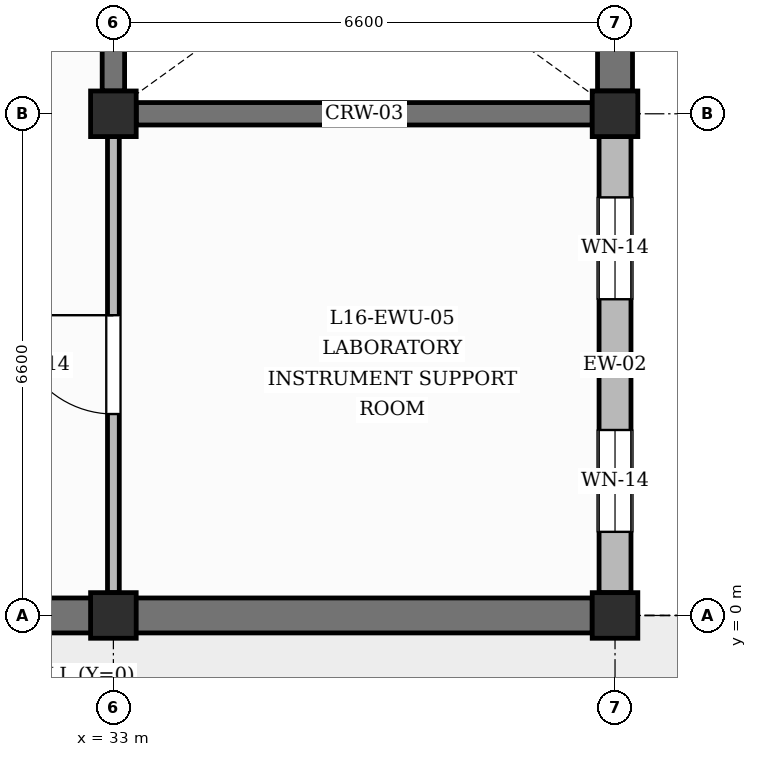
"""IFC4 building model, lengths in metres.
Left out: names, types, materials, properties, quantities, classifications, styles, units other than length and angle.
Written with IfcOpenShell. Run it as: python <this file> out.ifc"""

import sys

from ifc_helpers import new_model, si_unit, direction, frame, frame_2d, origin, origin_2d, place, context, subcontext, project, spatial, rectangle, extrude, element, fill, save


model = new_model("IFC4")
c1 = context("Model", 3, precision=1e-05, world=origin(), true_north=direction((0.0, 1.0)))
c2 = subcontext(c1, "Body", "Model", "MODEL_VIEW")
j1 = project(units=[si_unit("LENGTHUNIT", "METRE"), si_unit("PLANEANGLEUNIT", "RADIAN")], contexts=[c1])
p1 = place(None, origin())
s1 = spatial("IfcSite", under=j1, at=p1, CompositionType="ELEMENT")
p2 = place(p1, origin())
s2 = spatial("IfcBuilding", under=s1, at=p2, CompositionType="ELEMENT")
p3 = place(p2, frame((0.0, 0.0, 69.0)))
s3 = spatial("IfcBuildingStorey", under=s2, at=p3, CompositionType="ELEMENT", Elevation=69.0)
for number, where, z_axis, x_axis in (
    (1, (33.0, 0.0, 0.0), (0.0, 0.0, 1.0), (1.0, 0.0, 0.0)),
    (2, (33.0, 6.6, 0.0), (0.0, 0.0, 1.0), (1.0, 0.0, 0.0)),
    (3, (39.6, 0.0, 0.0), (0.0, 0.0, 1.0), (1.0, 0.0, 0.0)),
    (4, (39.6, 6.6, 0.0), (0.0, 0.0, 1.0), (1.0, 0.0, 0.0)),
):
    element("IfcColumn", number, at=place(p3, frame(where, z_axis=z_axis, x_axis=x_axis)), inside=s3, PredefinedType="COLUMN", context=c2, shape_type="SweptSolid", body=[
        extrude(rectangle(XDim=0.6, YDim=0.6, at=origin_2d()), origin(), (0.0, 0.0, 1.0), 4.2),
    ])
for number, where, z_axis, x_axis in (
    (5, (26.7, 0.0, 0.0), (0.0, 0.0, 1.0), (1.0, 0.0, 0.0)),
    (6, (33.3, 0.0, 0.0), (0.0, 0.0, 1.0), (1.0, 0.0, 0.0)),
):
    element("IfcWall", number, at=place(p3, frame(where, z_axis=z_axis, x_axis=x_axis)), inside=s3, PredefinedType="SOLIDWALL", context=c2, shape_type="SweptSolid", body=[
        extrude(rectangle(XDim=6.0, YDim=0.46, at=frame_2d((3.0, 0.0))), origin(), (0.0, 0.0, 1.0), 3.32),
    ])
p4 = place(p3, frame((39.6, 0.3, 0.0), z_axis=(0.0, 0.0, 1.0), x_axis=(0.0, 1.0, 0.0)))
e7 = element("IfcWall", 7, at=p4, inside=s3, PredefinedType="SOLIDWALL", context=c2, shape_type="SweptSolid", body=[
    extrude(rectangle(XDim=6.0, YDim=0.42, at=frame_2d((3.0, 0.0))), origin(), (0.0, 0.0, 1.0), 3.32),
])
p5 = place(p4, frame((0.8, 0.0, 0.95)))
e8 = element("IfcOpeningElement", 8, at=p5, cuts=e7, PredefinedType="OPENING", context=c2, shape_type="SweptSolid", body=[
    extrude(rectangle(XDim=1.34, YDim=1.52, at=frame_2d((0.67, 0.76))), frame((0.0, 0.22, 0.0), z_axis=(0.0, -1.0, 0.0), x_axis=(1.0, 0.0, 0.0)), (0.0, 0.0, 1.0), 0.44),
])
p6 = place(p4, frame((3.86, 0.0, 0.95)))
e9 = element("IfcOpeningElement", 9, at=p6, cuts=e7, PredefinedType="OPENING", context=c2, shape_type="SweptSolid", body=[
    extrude(rectangle(XDim=1.34, YDim=1.52, at=frame_2d((0.67, 0.76))), frame((0.0, 0.22, 0.0), z_axis=(0.0, -1.0, 0.0), x_axis=(1.0, 0.0, 0.0)), (0.0, 0.0, 1.0), 0.44),
])
p7 = place(p3, frame((39.6, 6.9, 0.0), z_axis=(0.0, 0.0, 1.0), x_axis=(0.0, 1.0, 0.0)))
e10 = element("IfcWall", 10, at=p7, inside=s3, PredefinedType="SOLIDWALL", context=c2, shape_type="SweptSolid", body=[
    extrude(rectangle(XDim=6.0, YDim=0.46, at=frame_2d((3.0, 0.0))), origin(), (0.0, 0.0, 1.0), 3.32),
])
p8 = place(p3, frame((33.3, 6.6, 0.0), z_axis=(0.0, 0.0, 1.0), x_axis=(1.0, 0.0, 0.0)))
e11 = element("IfcWall", 11, at=p8, inside=s3, PredefinedType="SHEAR", context=c2, shape_type="SweptSolid", body=[
    extrude(rectangle(XDim=6.0, YDim=0.295, at=frame_2d((3.0, 0.0))), origin(), (0.0, 0.0, 1.0), 3.56),
])
p9 = place(p3, frame((33.0, 6.9, 0.0), z_axis=(0.0, 0.0, 1.0), x_axis=(0.0, 1.0, 0.0)))
e12 = element("IfcWall", 12, at=p9, inside=s3, PredefinedType="SHEAR", context=c2, shape_type="SweptSolid", body=[
    extrude(rectangle(XDim=6.0, YDim=0.295, at=frame_2d((3.0, 0.0))), origin(), (0.0, 0.0, 1.0), 3.62),
])
p10 = place(p3, frame((33.0, 0.3, 0.0), z_axis=(0.0, 0.0, 1.0), x_axis=(0.0, 1.0, 0.0)))
e13 = element("IfcWall", 13, at=p10, inside=s3, PredefinedType="PARTITIONING", context=c2, shape_type="SweptSolid", body=[
    extrude(rectangle(XDim=6.0, YDim=0.155, at=frame_2d((3.0, 0.0))), origin(), (0.0, 0.0, 1.0), 3.62),
])
p11 = place(p10, frame((2.35, 0.0, 0.0)))
e14 = element("IfcOpeningElement", 14, at=p11, cuts=e13, PredefinedType="OPENING", context=c2, shape_type="SweptSolid", body=[
    extrude(rectangle(XDim=1.3, YDim=2.3, at=frame_2d((0.65, 1.15))), frame((0.0, 0.087, 0.0), z_axis=(0.0, -1.0, 0.0), x_axis=(1.0, 0.0, 0.0)), (0.0, 0.0, 1.0), 0.175),
])
p12 = place(p5, origin())
e15 = element("IfcWindow", 15, at=p12, inside=s3, PartitioningType="SINGLE_PANEL", PredefinedType="WINDOW", context=c2, shape_type="SweptSolid", body=[
    extrude(rectangle(XDim=1.34, YDim=1.52, at=frame_2d((0.67, 0.76))), frame((0.0, 0.03, 0.0), z_axis=(0.0, -1.0, 0.0), x_axis=(1.0, 0.0, 0.0)), (0.0, 0.0, 1.0), 0.06),
])
fill(e8, e15)
p13 = place(p6, origin())
e16 = element("IfcWindow", 16, at=p13, inside=s3, PartitioningType="SINGLE_PANEL", PredefinedType="WINDOW", context=c2, shape_type="SweptSolid", body=[
    extrude(rectangle(XDim=1.34, YDim=1.52, at=frame_2d((0.67, 0.76))), frame((0.0, 0.03, 0.0), z_axis=(0.0, -1.0, 0.0), x_axis=(1.0, 0.0, 0.0)), (0.0, 0.0, 1.0), 0.06),
])
fill(e9, e16)
p14 = place(p11, origin())
e17 = element("IfcDoor", 17, at=p14, inside=s3, OperationType="SINGLE_SWING_RIGHT", PredefinedType="DOOR", context=c2, shape_type="SweptSolid", body=[
    extrude(rectangle(XDim=1.3, YDim=2.3, at=frame_2d((0.65, 1.15))), frame((0.0, 0.025, 0.0), z_axis=(0.0, -1.0, 0.0), x_axis=(1.0, 0.0, 0.0)), (0.0, 0.0, 1.0), 0.05),
])
fill(e14, e17)
save(model, sys.argv[1])
